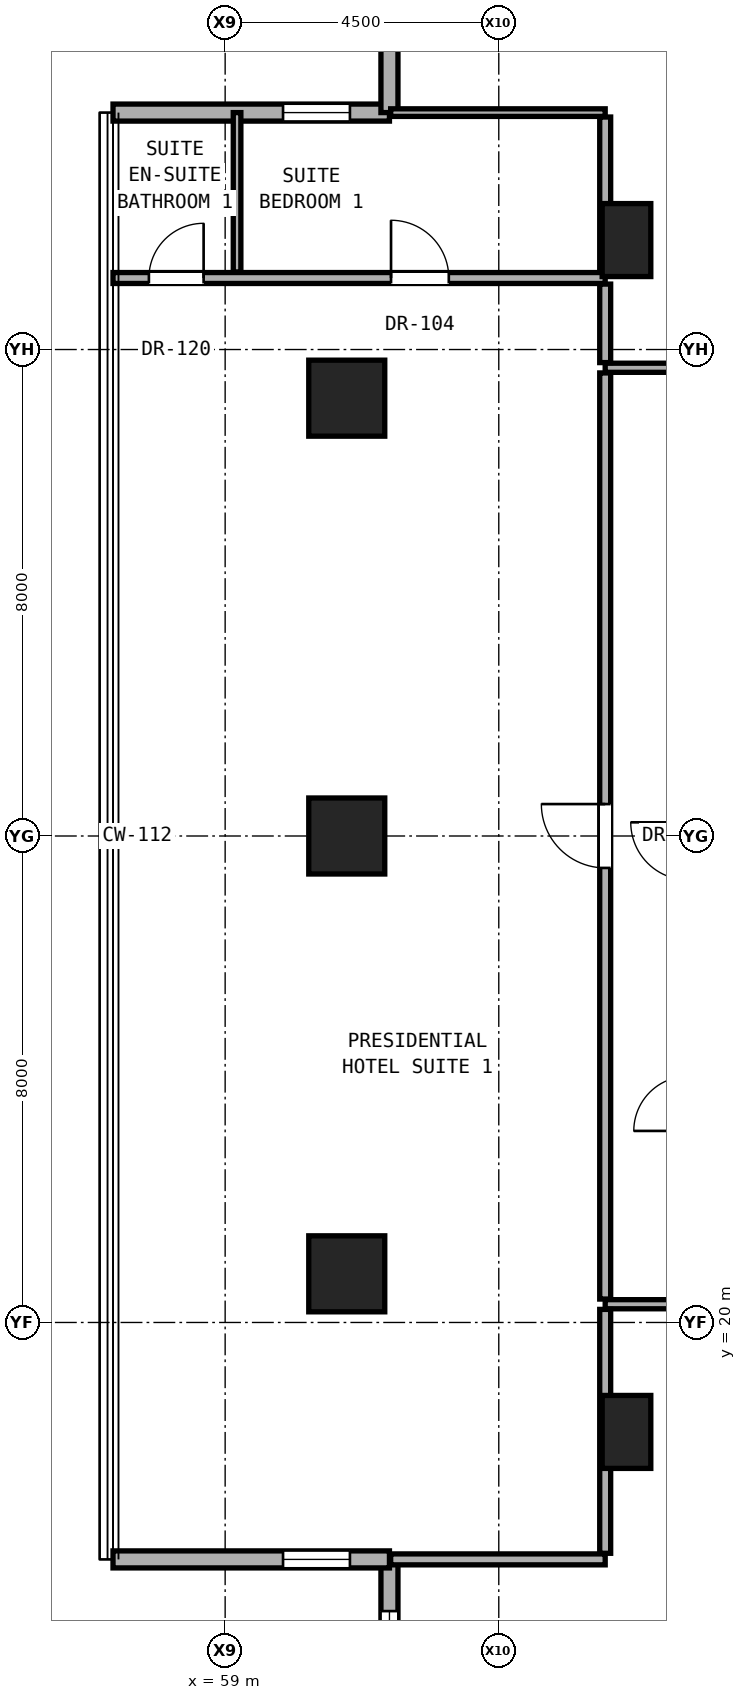
"""IFC4 building model, lengths in metres.
Left out: names, types, materials, properties, quantities, classifications, styles, units other than length and angle.
Written with IfcOpenShell. Run it as: python <this file> out.ifc"""

import sys

from ifc_helpers import new_model, si_unit, direction, frame, frame_2d, origin, origin_2d, place, context, subcontext, project, spatial, rectangle, hollow_rectangle, extrude, element, fill, save


model = new_model("IFC4")
c1 = context("Model", 3, precision=1e-05, world=origin(), true_north=direction((0.0, 1.0)))
c2 = subcontext(c1, "Body", "Model", "MODEL_VIEW")
j1 = project(units=[si_unit("LENGTHUNIT", "METRE"), si_unit("PLANEANGLEUNIT", "RADIAN")], contexts=[c1])
p1 = place(None, origin())
s1 = spatial("IfcSite", under=j1, at=p1, CompositionType="ELEMENT")
p2 = place(p1, origin())
s2 = spatial("IfcBuilding", under=s1, at=p2, CompositionType="ELEMENT")
p3 = place(p2, frame((0.0, 0.0, 78.5)))
s3 = spatial("IfcBuildingStorey", under=s2, at=p3, CompositionType="ELEMENT", Elevation=78.5)
for number, where, z_axis, x_axis in (
    (1, (61.0, 20.8, 0.0), (0.0, 0.0, 1.0), (1.0, 0.0, 0.0)),
    (2, (61.0, 28.0, 0.0), (0.0, 0.0, 1.0), (1.0, 0.0, 0.0)),
    (3, (61.0, 35.2, 0.0), (0.0, 0.0, 1.0), (1.0, 0.0, 0.0)),
):
    element("IfcColumn", number, at=place(p3, frame(where, z_axis=z_axis, x_axis=x_axis)), inside=s3, PredefinedType="COLUMN", context=c2, shape_type="SweptSolid", body=[
        extrude(hollow_rectangle(XDim=1.25, YDim=1.25, WallThickness=0.07, at=origin_2d()), origin(), (0.0, 0.0, 1.0), 3.3),
    ])
for number, where, z_axis, x_axis in (
    (4, (65.6, 18.2, 0.0), (0.0, 0.0, 1.0), (1.0, 0.0, 0.0)),
    (5, (65.6, 37.8, 0.0), (0.0, 0.0, 1.0), (1.0, 0.0, 0.0)),
):
    element("IfcColumn", number, at=place(p3, frame(where, z_axis=z_axis, x_axis=x_axis)), inside=s3, PredefinedType="PILASTER", context=c2, shape_type="SweptSolid", body=[
        extrude(rectangle(XDim=0.8, YDim=1.2, at=origin_2d()), origin(), (0.0, 0.0, 1.0), 3.3),
    ])
p4 = place(p3, frame((61.702, 16.104, 0.0), z_axis=(0.0, 0.0, 1.0), x_axis=(0.0, -1.0, 0.0)))
e6 = element("IfcWall", 6, at=p4, inside=s3, PredefinedType="SOLIDWALL", context=c2, shape_type="SweptSolid", body=[
    extrude(rectangle(XDim=4.546, YDim=0.28, at=frame_2d((2.273, 0.0))), origin(), (0.0, 0.0, 1.0), 2.56),
])
p5 = place(p4, frame((0.85, 0.0, 0.31)))
e7 = element("IfcOpeningElement", 7, at=p5, cuts=e6, PredefinedType="OPENING", context=c2, shape_type="SweptSolid", body=[
    extrude(rectangle(XDim=1.5, YDim=2.1, at=frame_2d((0.75, 1.05))), frame((0.0, 0.15, 0.0), z_axis=(0.0, -1.0, 0.0), x_axis=(1.0, 0.0, 0.0)), (0.0, 0.0, 1.0), 0.3),
])
p6 = place(p3, frame((57.156, 16.104, 0.0), z_axis=(0.0, 0.0, 1.0), x_axis=(1.0, 0.0, 0.0)))
e8 = element("IfcWall", 8, at=p6, inside=s3, PredefinedType="SOLIDWALL", context=c2, shape_type="SweptSolid", body=[
    extrude(rectangle(XDim=4.546, YDim=0.28, at=frame_2d((2.273, 0.0))), origin(), (0.0, 0.0, 1.0), 2.56),
])
p7 = place(p6, frame((2.796, 0.0, 0.41)))
e9 = element("IfcOpeningElement", 9, at=p7, cuts=e8, PredefinedType="OPENING", context=c2, shape_type="SweptSolid", body=[
    extrude(rectangle(XDim=1.1, YDim=2.0, at=frame_2d((0.55, 1.0))), frame((0.0, 0.15, 0.0), z_axis=(0.0, -1.0, 0.0), x_axis=(1.0, 0.0, 0.0)), (0.0, 0.0, 1.0), 0.3),
])
p8 = place(p3, frame((61.702, 39.896, 0.0), z_axis=(0.0, 0.0, 1.0), x_axis=(-1.0, 0.0, 0.0)))
e10 = element("IfcWall", 10, at=p8, inside=s3, PredefinedType="SOLIDWALL", context=c2, shape_type="SweptSolid", body=[
    extrude(rectangle(XDim=4.546, YDim=0.28, at=frame_2d((2.273, 0.0))), origin(), (0.0, 0.0, 1.0), 2.56),
])
p9 = place(p8, frame((0.65, 0.0, 0.41)))
e11 = element("IfcOpeningElement", 11, at=p9, cuts=e10, PredefinedType="OPENING", context=c2, shape_type="SweptSolid", body=[
    extrude(rectangle(XDim=1.1, YDim=2.0, at=frame_2d((0.55, 1.0))), frame((0.0, 0.15, 0.0), z_axis=(0.0, -1.0, 0.0), x_axis=(1.0, 0.0, 0.0)), (0.0, 0.0, 1.0), 0.3),
])
p10 = place(p3, frame((61.702, 44.442, 0.0), z_axis=(0.0, 0.0, 1.0), x_axis=(0.0, -1.0, 0.0)))
e12 = element("IfcWall", 12, at=p10, inside=s3, PredefinedType="SOLIDWALL", context=c2, shape_type="SweptSolid", body=[
    extrude(rectangle(XDim=4.546, YDim=0.28, at=frame_2d((2.273, 0.0))), origin(), (0.0, 0.0, 1.0), 2.56),
])
p11 = place(p3, frame((61.722, 16.104, 0.0), z_axis=(0.0, 0.0, 1.0), x_axis=(1.0, 0.0, 0.0)))
e13 = element("IfcWall", 13, at=p11, inside=s3, PredefinedType="PARTITIONING", context=c2, shape_type="SweptSolid", body=[
    extrude(rectangle(XDim=3.528, YDim=0.18, at=frame_2d((1.764, 0.0))), origin(), (0.0, 0.0, 1.0), 2.94),
])
for number, where, z_axis, x_axis in (
    (14, (65.25, 20.3, 0.0), (0.0, 0.0, 1.0), (1.0, 0.0, 0.0)),
    (15, (65.25, 35.7, 0.0), (0.0, 0.0, 1.0), (1.0, 0.0, 0.0)),
):
    element("IfcWall", number, at=place(p3, frame(where, z_axis=z_axis, x_axis=x_axis)), inside=s3, PredefinedType="PARTITIONING", context=c2, shape_type="SweptSolid", body=[
        extrude(rectangle(XDim=1.37, YDim=0.15, at=frame_2d((0.685, 0.0))), origin(), (0.0, 0.0, 1.0), 2.94),
    ])
p12 = place(p3, frame((57.156, 37.176, 0.0), z_axis=(0.0, 0.0, 1.0), x_axis=(1.0, 0.0, 0.0)))
e16 = element("IfcWall", 16, at=p12, inside=s3, PredefinedType="PARTITIONING", context=c2, shape_type="SweptSolid", body=[
    extrude(rectangle(XDim=8.094, YDim=0.18, at=frame_2d((4.047, 0.0))), origin(), (0.0, 0.0, 1.0), 2.316),
])
p13 = place(p12, frame((4.572, 0.0, 0.0)))
e17 = element("IfcOpeningElement", 17, at=p13, cuts=e16, PredefinedType="OPENING", context=c2, shape_type="SweptSolid", body=[
    extrude(rectangle(XDim=0.95, YDim=2.15, at=frame_2d((0.475, 1.075))), frame((0.0, 0.1, 0.0), z_axis=(0.0, -1.0, 0.0), x_axis=(1.0, 0.0, 0.0)), (0.0, 0.0, 1.0), 0.2),
])
p14 = place(p12, frame((0.59, 0.0, 0.0)))
e18 = element("IfcOpeningElement", 18, at=p14, cuts=e16, PredefinedType="OPENING", context=c2, shape_type="SweptSolid", body=[
    extrude(rectangle(XDim=0.9, YDim=2.1, at=frame_2d((0.45, 1.05))), frame((0.0, 0.1, 0.0), z_axis=(0.0, -1.0, 0.0), x_axis=(1.0, 0.0, 0.0)), (0.0, 0.0, 1.0), 0.2),
])
p15 = place(p3, frame((61.722, 39.896, 0.0), z_axis=(0.0, 0.0, 1.0), x_axis=(1.0, 0.0, 0.0)))
e19 = element("IfcWall", 19, at=p15, inside=s3, PredefinedType="PARTITIONING", context=c2, shape_type="SweptSolid", body=[
    extrude(rectangle(XDim=3.528, YDim=0.125, at=frame_2d((1.764, 0.0))), origin(), (0.0, 0.0, 1.0), 2.94),
])
p16 = place(p3, frame((59.196, 37.276, 0.0), z_axis=(0.0, 0.0, 1.0), x_axis=(0.0, 1.0, 0.0)))
e20 = element("IfcWall", 20, at=p16, inside=s3, PredefinedType="PARTITIONING", context=c2, shape_type="SweptSolid", body=[
    extrude(rectangle(XDim=2.62, YDim=0.125, at=frame_2d((1.31, 0.0))), origin(), (0.0, 0.0, 1.0), 2.94),
])
p17 = place(p3, frame((65.25, 16.204, 0.0), z_axis=(0.0, 0.0, 1.0), x_axis=(0.0, 1.0, 0.0)))
e21 = element("IfcWall", 21, at=p17, inside=s3, PredefinedType="PARTITIONING", context=c2, shape_type="SweptSolid", body=[
    extrude(rectangle(XDim=4.011, YDim=0.18, at=frame_2d((2.005, 0.0))), origin(), (0.0, 0.0, 1.0), 2.316),
])
p18 = place(p3, frame((65.25, 20.385, 0.0), z_axis=(0.0, 0.0, 1.0), x_axis=(0.0, 1.0, 0.0)))
e22 = element("IfcWall", 22, at=p18, inside=s3, PredefinedType="PARTITIONING", context=c2, shape_type="SweptSolid", body=[
    extrude(rectangle(XDim=15.23, YDim=0.18, at=frame_2d((7.615, 0.0))), origin(), (0.0, 0.0, 1.0), 2.316),
])
p19 = place(p18, frame((7.09, 0.0, 0.0)))
e23 = element("IfcOpeningElement", 23, at=p19, cuts=e22, PredefinedType="OPENING", context=c2, shape_type="SweptSolid", body=[
    extrude(rectangle(XDim=1.05, YDim=2.2, at=frame_2d((0.525, 1.1))), frame((0.0, 0.1, 0.0), z_axis=(0.0, -1.0, 0.0), x_axis=(1.0, 0.0, 0.0)), (0.0, 0.0, 1.0), 0.2),
])
p20 = place(p3, frame((65.25, 35.785, 0.0), z_axis=(0.0, 0.0, 1.0), x_axis=(0.0, 1.0, 0.0)))
e24 = element("IfcWall", 24, at=p20, inside=s3, PredefinedType="PARTITIONING", context=c2, shape_type="SweptSolid", body=[
    extrude(rectangle(XDim=1.291, YDim=0.18, at=frame_2d((0.646, 0.0))), origin(), (0.0, 0.0, 1.0), 2.94),
])
p21 = place(p3, frame((65.25, 37.276, 0.0), z_axis=(0.0, 0.0, 1.0), x_axis=(0.0, 1.0, 0.0)))
e25 = element("IfcWall", 25, at=p21, inside=s3, PredefinedType="PARTITIONING", context=c2, shape_type="SweptSolid", body=[
    extrude(rectangle(XDim=2.548, YDim=0.18, at=frame_2d((1.274, 0.0))), origin(), (0.0, 0.0, 1.0), 2.316),
])
p22 = place(p5, origin())
e26 = element("IfcWindow", 26, at=p22, inside=s3, PartitioningType="SINGLE_PANEL", PredefinedType="WINDOW", context=c2, shape_type="SweptSolid", body=[
    extrude(rectangle(XDim=1.5, YDim=2.1, at=frame_2d((0.75, 1.05))), frame((0.0, 0.03, 0.0), z_axis=(0.0, -1.0, 0.0), x_axis=(1.0, 0.0, 0.0)), (0.0, 0.0, 1.0), 0.06),
])
fill(e7, e26)
p23 = place(p7, origin())
e27 = element("IfcWindow", 27, at=p23, inside=s3, PartitioningType="SINGLE_PANEL", PredefinedType="WINDOW", context=c2, shape_type="SweptSolid", body=[
    extrude(rectangle(XDim=1.1, YDim=2.0, at=frame_2d((0.55, 1.0))), frame((0.0, 0.03, 0.0), z_axis=(0.0, -1.0, 0.0), x_axis=(1.0, 0.0, 0.0)), (0.0, 0.0, 1.0), 0.06),
])
fill(e9, e27)
p24 = place(p9, origin())
e28 = element("IfcWindow", 28, at=p24, inside=s3, PartitioningType="SINGLE_PANEL", PredefinedType="WINDOW", context=c2, shape_type="SweptSolid", body=[
    extrude(rectangle(XDim=1.1, YDim=2.0, at=frame_2d((0.55, 1.0))), frame((0.0, 0.03, 0.0), z_axis=(0.0, -1.0, 0.0), x_axis=(1.0, 0.0, 0.0)), (0.0, 0.0, 1.0), 0.06),
])
fill(e11, e28)
p25 = place(p19, origin())
e29 = element("IfcDoor", 29, at=p25, inside=s3, OperationType="SINGLE_SWING_RIGHT", PredefinedType="DOOR", context=c2, shape_type="SweptSolid", body=[
    extrude(rectangle(XDim=1.05, YDim=2.2, at=frame_2d((0.525, 1.1))), frame((0.0, 0.025, 0.0), z_axis=(0.0, -1.0, 0.0), x_axis=(1.0, 0.0, 0.0)), (0.0, 0.0, 1.0), 0.05),
])
fill(e23, e29)
p26 = place(p13, origin())
e30 = element("IfcDoor", 30, at=p26, inside=s3, OperationType="SINGLE_SWING_LEFT", PredefinedType="DOOR", context=c2, shape_type="SweptSolid", body=[
    extrude(rectangle(XDim=0.95, YDim=2.15, at=frame_2d((0.475, 1.075))), frame((0.0, 0.025, 0.0), z_axis=(0.0, -1.0, 0.0), x_axis=(1.0, 0.0, 0.0)), (0.0, 0.0, 1.0), 0.05),
])
fill(e17, e30)
p27 = place(p14, origin())
e31 = element("IfcDoor", 31, at=p27, inside=s3, OperationType="SINGLE_SWING_RIGHT", PredefinedType="DOOR", context=c2, shape_type="SweptSolid", body=[
    extrude(rectangle(XDim=0.9, YDim=2.1, at=frame_2d((0.45, 1.05))), frame((0.0, 0.025, 0.0), z_axis=(0.0, -1.0, 0.0), x_axis=(1.0, 0.0, 0.0)), (0.0, 0.0, 1.0), 0.05),
])
fill(e18, e31)
save(model, sys.argv[1])
